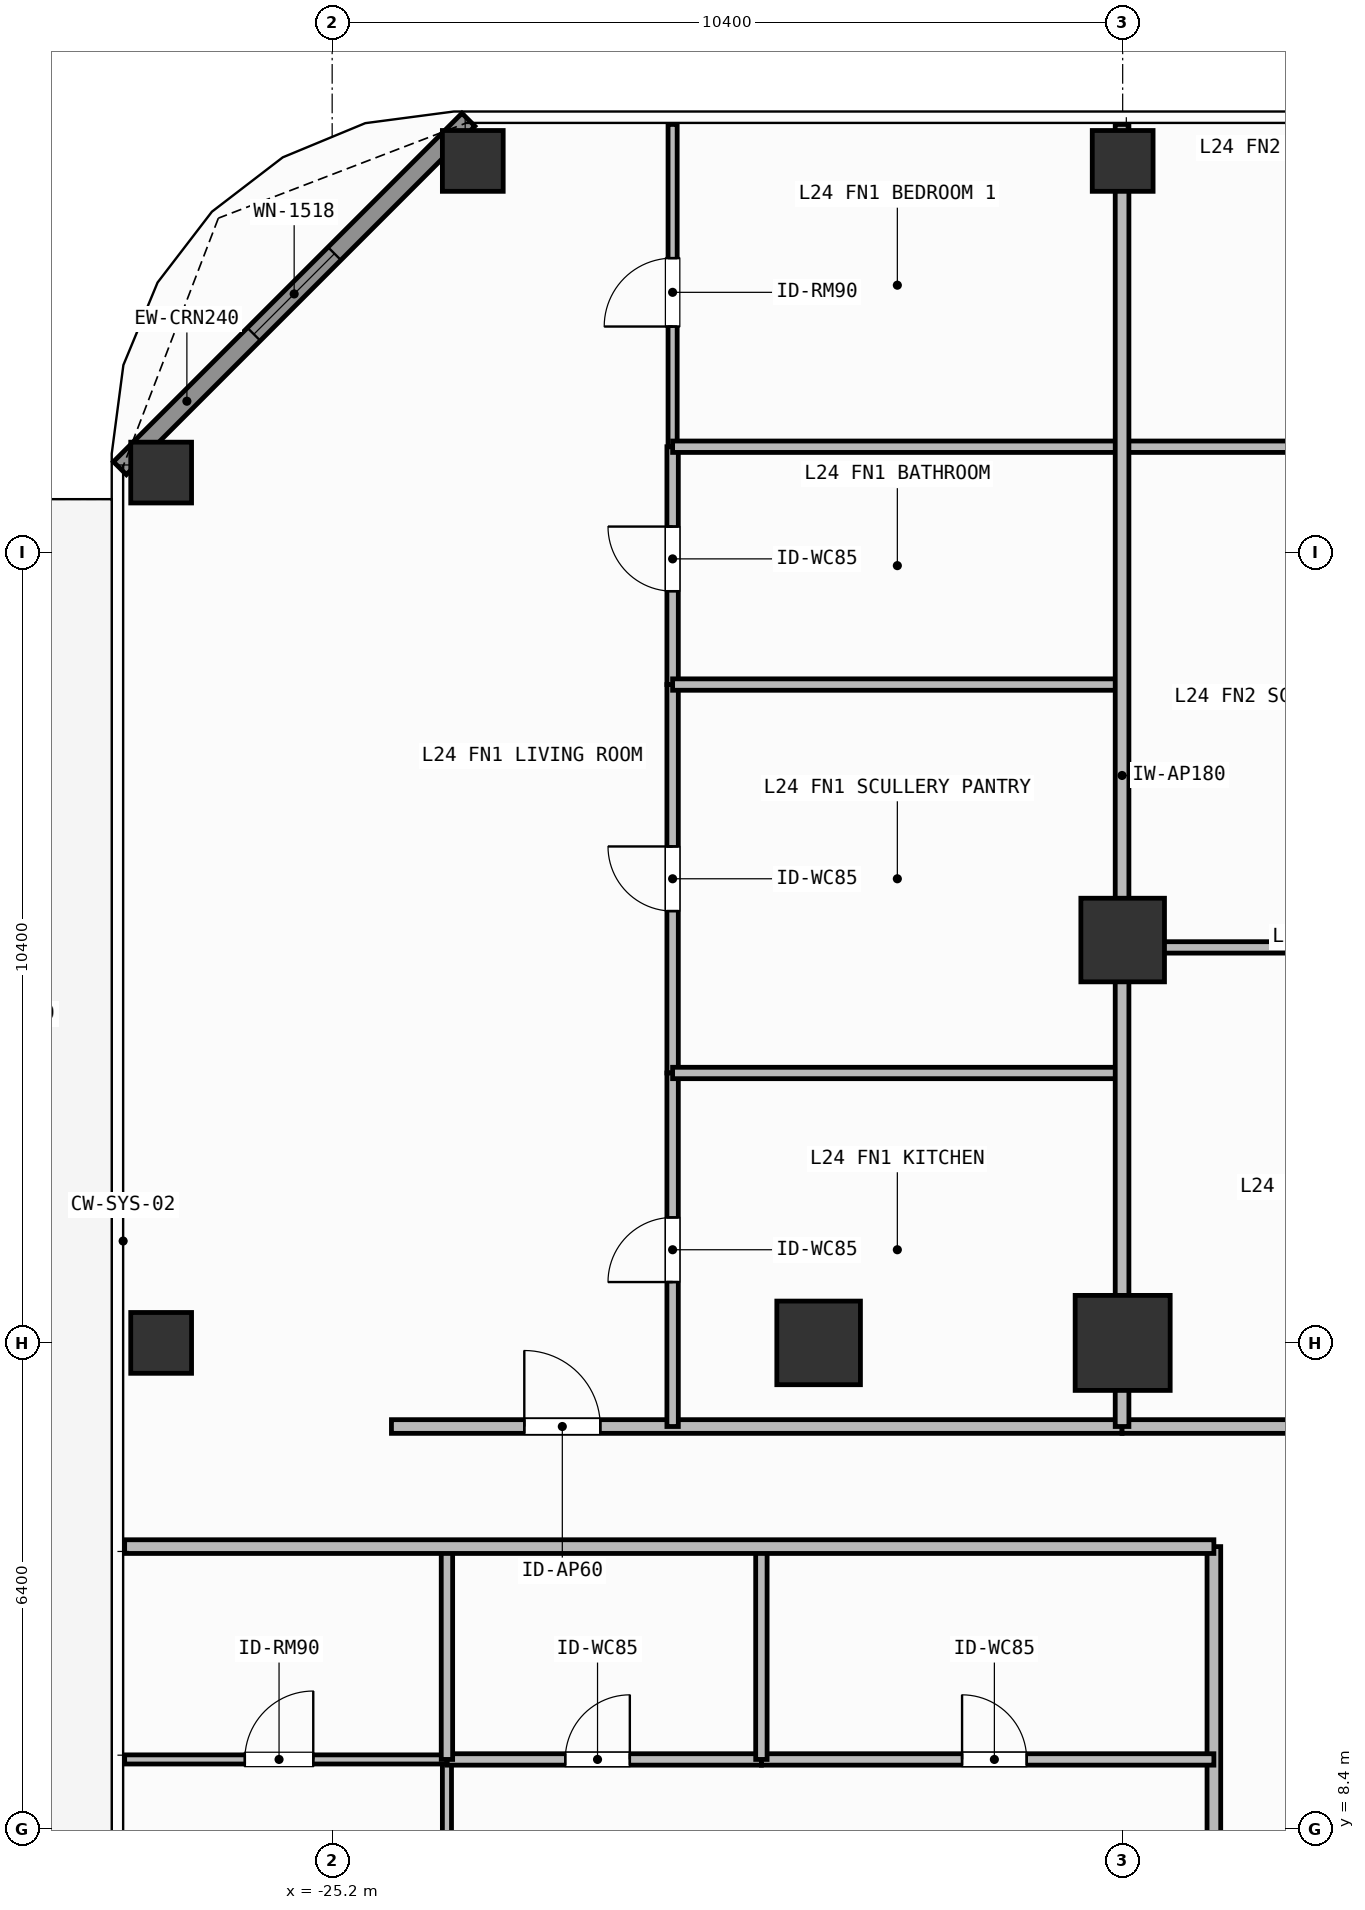
"""IFC4 building model, lengths in metres.
Left out: names, types, materials, properties, quantities, classifications, styles, units other than length and angle.
Written with IfcOpenShell. Run it as: python <this file> out.ifc"""

import sys

from ifc_helpers import new_model, si_unit, direction, frame, frame_2d, origin, origin_2d, place, context, subcontext, project, spatial, rectangle, hollow_rectangle, extrude, element, fill, save


model = new_model("IFC4")
c1 = context("Model", 3, precision=1e-05, world=origin(), true_north=direction((0.0, 1.0)))
c2 = subcontext(c1, "Body", "Model", "MODEL_VIEW")
j1 = project(units=[si_unit("LENGTHUNIT", "METRE"), si_unit("PLANEANGLEUNIT", "RADIAN")], contexts=[c1])
p1 = place(None, origin())
s1 = spatial("IfcSite", under=j1, at=p1, CompositionType="ELEMENT")
p2 = place(p1, origin())
s2 = spatial("IfcBuilding", under=s1, at=p2, CompositionType="ELEMENT")
p3 = place(p2, frame((0.0, 0.0, 96.9)))
s3 = spatial("IfcBuildingStorey", under=s2, at=p3, CompositionType="ELEMENT", Elevation=96.9)
p4 = place(p3, frame((-14.8, 14.8, 0.0), z_axis=(0.0, 0.0, 1.0), x_axis=(1.0, 0.0, 0.0)))
e1 = element("IfcColumn", 1, at=p4, inside=s3, PredefinedType="COLUMN", context=c2, shape_type="SweptSolid", body=[
    extrude(rectangle(XDim=1.25, YDim=1.25, at=origin_2d()), origin(), (0.0, 0.0, 1.0), 3.9),
])
for number, where, z_axis, x_axis in (
    (2, (-18.8, 14.8, 0.0), (0.0, 0.0, 1.0), (1.0, 0.0, 0.0)),
    (3, (-14.8, 20.1, 0.0), (0.0, 0.0, 1.0), (1.0, 0.0, 0.0)),
):
    element("IfcColumn", number, at=place(p3, frame(where, z_axis=z_axis, x_axis=x_axis)), inside=s3, PredefinedType="COLUMN", context=c2, shape_type="SweptSolid", body=[
        extrude(rectangle(XDim=1.1, YDim=1.1, at=origin_2d()), origin(), (0.0, 0.0, 1.0), 3.9),
    ])
for number, where, z_axis, x_axis in (
    (4, (-23.35, 30.35, 0.0), (0.0, 0.0, 1.0), (1.0, 0.0, 0.0)),
    (5, (-27.45, 26.25, 0.0), (0.0, 0.0, 1.0), (1.0, 0.0, 0.0)),
    (6, (-14.8, 30.35, 0.0), (0.0, 0.0, 1.0), (1.0, 0.0, 0.0)),
    (7, (-27.45, 14.8, 0.0), (0.0, 0.0, 1.0), (1.0, 0.0, 0.0)),
):
    element("IfcColumn", number, at=place(p3, frame(where, z_axis=z_axis, x_axis=x_axis)), inside=s3, PredefinedType="COLUMN", context=c2, shape_type="SweptSolid", body=[
        extrude(hollow_rectangle(XDim=0.8, YDim=0.8, WallThickness=0.036, at=origin_2d()), origin(), (0.0, 0.0, 1.0), 3.9),
    ])
p5 = place(p3, frame((-27.992, 26.308, 0.0), z_axis=(0.0, 0.0, 1.0), x_axis=(0.707106781187, 0.707106781187, 0.0)))
e8 = element("IfcWall", 8, at=p5, inside=s3, PredefinedType="SOLIDWALL", context=c2, shape_type="SweptSolid", body=[
    extrude(rectangle(XDim=6.484, YDim=0.24, at=frame_2d((3.242, 0.0))), origin(), (0.0, 0.0, 1.0), 3.68),
])
p6 = place(p5, frame((2.492, 0.0, 0.8)))
e9 = element("IfcOpeningElement", 9, at=p6, cuts=e8, PredefinedType="OPENING", context=c2, shape_type="SweptSolid", body=[
    extrude(rectangle(XDim=1.5, YDim=1.85, at=frame_2d((0.75, 0.925))), frame((0.0, 0.13, 0.0), z_axis=(0.0, -1.0, 0.0), x_axis=(1.0, 0.0, 0.0)), (0.0, 0.0, 1.0), 0.26),
])
p7 = place(p3, frame((-24.42, 13.7, 0.0), z_axis=(0.0, 0.0, 1.0), x_axis=(1.0, 0.0, 0.0)))
e10 = element("IfcWall", 10, at=p7, inside=s3, PredefinedType="PARTITIONING", context=c2, shape_type="SweptSolid", body=[
    extrude(rectangle(XDim=9.612, YDim=0.18, at=frame_2d((4.806, 0.0))), origin(), (0.0, 0.0, 1.0), 3.68),
])
p8 = place(p7, frame((1.748, 0.0, 0.0)))
e11 = element("IfcOpeningElement", 11, at=p8, cuts=e10, PredefinedType="OPENING", context=c2, shape_type="SweptSolid", body=[
    extrude(rectangle(XDim=1.0, YDim=2.2, at=frame_2d((0.5, 1.1))), frame((0.0, 0.1, 0.0), z_axis=(0.0, -1.0, 0.0), x_axis=(1.0, 0.0, 0.0)), (0.0, 0.0, 1.0), 0.2),
])
p9 = place(p3, frame((-20.721, 18.351, 0.0), z_axis=(0.0, 0.0, 1.0), x_axis=(0.0, 1.0, 0.0)))
e12 = element("IfcWall", 12, at=p9, inside=s3, PredefinedType="PARTITIONING", context=c2, shape_type="SweptSolid", body=[
    extrude(rectangle(XDim=5.11, YDim=0.15, at=frame_2d((2.555, 0.0))), origin(), (0.0, 0.0, 1.0), 3.68),
])
p10 = place(p9, frame((2.13, 0.0, 0.0)))
e13 = element("IfcOpeningElement", 13, at=p10, cuts=e12, PredefinedType="OPENING", context=c2, shape_type="SweptSolid", body=[
    extrude(rectangle(XDim=0.85, YDim=2.1, at=frame_2d((0.425, 1.05))), frame((0.0, 0.085, 0.0), z_axis=(0.0, -1.0, 0.0), x_axis=(1.0, 0.0, 0.0)), (0.0, 0.0, 1.0), 0.17),
])
p11 = place(p3, frame((-20.721, 13.7, 0.0), z_axis=(0.0, 0.0, 1.0), x_axis=(0.0, 1.0, 0.0)))
e14 = element("IfcWall", 14, at=p11, inside=s3, PredefinedType="PARTITIONING", context=c2, shape_type="SweptSolid", body=[
    extrude(rectangle(XDim=4.651, YDim=0.15, at=frame_2d((2.326, 0.0))), origin(), (0.0, 0.0, 1.0), 3.68),
])
p12 = place(p11, frame((1.9, 0.0, 0.0)))
e15 = element("IfcOpeningElement", 15, at=p12, cuts=e14, PredefinedType="OPENING", context=c2, shape_type="SweptSolid", body=[
    extrude(rectangle(XDim=0.85, YDim=2.1, at=frame_2d((0.425, 1.05))), frame((0.0, 0.085, 0.0), z_axis=(0.0, -1.0, 0.0), x_axis=(1.0, 0.0, 0.0)), (0.0, 0.0, 1.0), 0.17),
])
p13 = place(p3, frame((-20.721, 23.461, 0.0), z_axis=(0.0, 0.0, 1.0), x_axis=(0.0, 1.0, 0.0)))
e16 = element("IfcWall", 16, at=p13, inside=s3, PredefinedType="PARTITIONING", context=c2, shape_type="SweptSolid", body=[
    extrude(rectangle(XDim=3.129, YDim=0.15, at=frame_2d((1.564, 0.0))), origin(), (0.0, 0.0, 1.0), 3.68),
])
p14 = place(p13, frame((1.229, 0.0, 0.0)))
e17 = element("IfcOpeningElement", 17, at=p14, cuts=e16, PredefinedType="OPENING", context=c2, shape_type="SweptSolid", body=[
    extrude(rectangle(XDim=0.85, YDim=2.1, at=frame_2d((0.425, 1.05))), frame((0.0, 0.085, 0.0), z_axis=(0.0, -1.0, 0.0), x_axis=(1.0, 0.0, 0.0)), (0.0, 0.0, 1.0), 0.17),
])
p15 = place(p3, frame((-20.721, 26.59, 0.0), z_axis=(0.0, 0.0, 1.0), x_axis=(0.0, 1.0, 0.0)))
e18 = element("IfcWall", 18, at=p15, inside=s3, PredefinedType="PARTITIONING", context=c2, shape_type="SweptSolid", body=[
    extrude(rectangle(XDim=4.24, YDim=0.12, at=frame_2d((2.12, 0.0))), origin(), (0.0, 0.0, 1.0), 3.68),
])
p16 = place(p15, frame((1.581, 0.0, 0.0)))
e19 = element("IfcOpeningElement", 19, at=p16, cuts=e18, PredefinedType="OPENING", context=c2, shape_type="SweptSolid", body=[
    extrude(rectangle(XDim=0.9, YDim=2.1, at=frame_2d((0.45, 1.05))), frame((0.0, 0.07, 0.0), z_axis=(0.0, -1.0, 0.0), x_axis=(1.0, 0.0, 0.0)), (0.0, 0.0, 1.0), 0.14),
])
p17 = place(p3, frame((-14.808, 13.7, 0.0), z_axis=(0.0, 0.0, 1.0), x_axis=(1.0, 0.0, 0.0)))
e20 = element("IfcWall", 20, at=p17, inside=s3, PredefinedType="PARTITIONING", context=c2, shape_type="SweptSolid", body=[
    extrude(rectangle(XDim=21.212, YDim=0.18, at=frame_2d((10.606, 0.0))), origin(), (0.0, 0.0, 1.0), 3.68),
])
p18 = place(p17, frame((11.271, 0.0, 0.0)))
e21 = element("IfcOpeningElement", 21, at=p18, cuts=e20, PredefinedType="OPENING", context=c2, shape_type="SweptSolid", body=[
    extrude(rectangle(XDim=1.0, YDim=2.2, at=frame_2d((0.5, 1.1))), frame((0.0, 0.1, 0.0), z_axis=(0.0, -1.0, 0.0), x_axis=(1.0, 0.0, 0.0)), (0.0, 0.0, 1.0), 0.2),
])
p19 = place(p3, frame((-13.6, -1.6, 0.0), z_axis=(0.0, 0.0, 1.0), x_axis=(0.0, 1.0, 0.0)))
e22 = element("IfcWall", 22, at=p19, inside=s3, PredefinedType="PARTITIONING", context=c2, shape_type="SweptSolid", body=[
    extrude(rectangle(XDim=13.72, YDim=0.18, at=frame_2d((6.86, 0.0))), origin(), (0.0, 0.0, 1.0), 3.68),
])
p20 = place(p19, frame((6.989, 0.0, 0.0)))
e23 = element("IfcOpeningElement", 23, at=p20, cuts=e22, PredefinedType="OPENING", context=c2, shape_type="SweptSolid", body=[
    extrude(rectangle(XDim=1.0, YDim=2.2, at=frame_2d((0.5, 1.1))), frame((0.0, 0.1, 0.0), z_axis=(0.0, -1.0, 0.0), x_axis=(1.0, 0.0, 0.0)), (0.0, 0.0, 1.0), 0.2),
])
p21 = place(p3, frame((-23.69, 2.591, 0.0), z_axis=(0.0, 0.0, 1.0), x_axis=(0.0, 1.0, 0.0)))
e24 = element("IfcWall", 24, at=p21, inside=s3, PredefinedType="PARTITIONING", context=c2, shape_type="SweptSolid", body=[
    extrude(rectangle(XDim=6.729, YDim=0.12, at=frame_2d((3.365, 0.0))), origin(), (0.0, 0.0, 1.0), 3.68),
])
p22 = place(p21, frame((2.826, 0.0, 0.0)))
e25 = element("IfcOpeningElement", 25, at=p22, cuts=e24, PredefinedType="OPENING", context=c2, shape_type="SweptSolid", body=[
    extrude(rectangle(XDim=0.9, YDim=2.1, at=frame_2d((0.45, 1.05))), frame((0.0, 0.07, 0.0), z_axis=(0.0, -1.0, 0.0), x_axis=(1.0, 0.0, 0.0)), (0.0, 0.0, 1.0), 0.14),
])
p23 = place(p3, frame((-23.69, 9.32, 0.0), z_axis=(0.0, 0.0, 1.0), x_axis=(1.0, 0.0, 0.0)))
e26 = element("IfcWall", 26, at=p23, inside=s3, PredefinedType="PARTITIONING", context=c2, shape_type="SweptSolid", body=[
    extrude(rectangle(XDim=4.137, YDim=0.15, at=frame_2d((2.068, 0.0))), origin(), (0.0, 0.0, 1.0), 3.68),
])
p24 = place(p23, frame((1.556, 0.0, 0.0)))
e27 = element("IfcOpeningElement", 27, at=p24, cuts=e26, PredefinedType="OPENING", context=c2, shape_type="SweptSolid", body=[
    extrude(rectangle(XDim=0.85, YDim=2.1, at=frame_2d((0.425, 1.05))), frame((0.0, 0.085, 0.0), z_axis=(0.0, -1.0, 0.0), x_axis=(1.0, 0.0, 0.0)), (0.0, 0.0, 1.0), 0.17),
])
p25 = place(p3, frame((-19.553, 9.32, 0.0), z_axis=(0.0, 0.0, 1.0), x_axis=(1.0, 0.0, 0.0)))
e28 = element("IfcWall", 28, at=p25, inside=s3, PredefinedType="PARTITIONING", context=c2, shape_type="SweptSolid", body=[
    extrude(rectangle(XDim=5.953, YDim=0.15, at=frame_2d((2.977, 0.0))), origin(), (0.0, 0.0, 1.0), 3.68),
])
p26 = place(p25, frame((2.64, 0.0, 0.0)))
e29 = element("IfcOpeningElement", 29, at=p26, cuts=e28, PredefinedType="OPENING", context=c2, shape_type="SweptSolid", body=[
    extrude(rectangle(XDim=0.85, YDim=2.1, at=frame_2d((0.425, 1.05))), frame((0.0, 0.085, 0.0), z_axis=(0.0, -1.0, 0.0), x_axis=(1.0, 0.0, 0.0)), (0.0, 0.0, 1.0), 0.17),
])
p27 = place(p3, frame((-27.93, 9.32, 0.0), z_axis=(0.0, 0.0, 1.0), x_axis=(1.0, 0.0, 0.0)))
e30 = element("IfcWall", 30, at=p27, inside=s3, PredefinedType="PARTITIONING", context=c2, shape_type="SweptSolid", body=[
    extrude(rectangle(XDim=4.24, YDim=0.12, at=frame_2d((2.12, 0.0))), origin(), (0.0, 0.0, 1.0), 3.68),
])
p28 = place(p27, frame((1.581, 0.0, 0.0)))
e31 = element("IfcOpeningElement", 31, at=p28, cuts=e30, PredefinedType="OPENING", context=c2, shape_type="SweptSolid", body=[
    extrude(rectangle(XDim=0.9, YDim=2.1, at=frame_2d((0.45, 1.05))), frame((0.0, 0.07, 0.0), z_axis=(0.0, -1.0, 0.0), x_axis=(1.0, 0.0, 0.0)), (0.0, 0.0, 1.0), 0.14),
])
for number, where, z_axis, x_axis in (
    (32, (-20.721, 18.351, 0.0), (0.0, 0.0, 1.0), (1.0, 0.0, 0.0)),
    (33, (-20.721, 23.461, 0.0), (0.0, 0.0, 1.0), (1.0, 0.0, 0.0)),
    (34, (-20.721, 26.59, 0.0), (0.0, 0.0, 1.0), (1.0, 0.0, 0.0)),
):
    element("IfcWall", number, at=place(p3, frame(where, z_axis=z_axis, x_axis=x_axis)), inside=s3, PredefinedType="PARTITIONING", context=c2, shape_type="SweptSolid", body=[
        extrude(rectangle(XDim=5.913, YDim=0.15, at=frame_2d((2.957, 0.0))), origin(), (0.0, 0.0, 1.0), 3.68),
    ])
p29 = place(p3, frame((-14.808, 20.003, 0.0), z_axis=(0.0, 0.0, 1.0), x_axis=(1.0, 0.0, 0.0)))
e35 = element("IfcWall", 35, at=p29, inside=s3, PredefinedType="PARTITIONING", context=c2, shape_type="SweptSolid", body=[
    extrude(rectangle(XDim=5.394, YDim=0.15, at=frame_2d((2.697, 0.0))), origin(), (0.0, 0.0, 1.0), 3.082),
])
p30 = place(p3, frame((-14.808, 26.59, 0.0), z_axis=(0.0, 0.0, 1.0), x_axis=(1.0, 0.0, 0.0)))
e36 = element("IfcWall", 36, at=p30, inside=s3, PredefinedType="PARTITIONING", context=c2, shape_type="SweptSolid", body=[
    extrude(rectangle(XDim=5.394, YDim=0.15, at=frame_2d((2.697, 0.0))), origin(), (0.0, 0.0, 1.0), 3.68),
])
p31 = place(p3, frame((-14.808, 13.7, 0.0), z_axis=(0.0, 0.0, 1.0), x_axis=(0.0, 1.0, 0.0)))
e37 = element("IfcWall", 37, at=p31, inside=s3, PredefinedType="PARTITIONING", context=c2, shape_type="SweptSolid", body=[
    extrude(rectangle(XDim=17.13, YDim=0.18, at=frame_2d((8.565, 0.0))), origin(), (0.0, 0.0, 1.0), 3.082),
])
for number, where, z_axis, x_axis in (
    (38, (-19.553, 9.32, 0.0), (0.0, 0.0, 1.0), (0.0, 1.0, 0.0)),
    (39, (-23.69, 9.32, 0.0), (0.0, 0.0, 1.0), (0.0, 1.0, 0.0)),
):
    element("IfcWall", number, at=place(p3, frame(where, z_axis=z_axis, x_axis=x_axis)), inside=s3, PredefinedType="PARTITIONING", context=c2, shape_type="SweptSolid", body=[
        extrude(rectangle(XDim=2.8, YDim=0.15, at=frame_2d((1.4, 0.0))), origin(), (0.0, 0.0, 1.0), 3.68),
    ])
p32 = place(p3, frame((-27.93, 12.12, 0.0), z_axis=(0.0, 0.0, 1.0), x_axis=(1.0, 0.0, 0.0)))
e40 = element("IfcWall", 40, at=p32, inside=s3, PredefinedType="PARTITIONING", context=c2, shape_type="SweptSolid", body=[
    extrude(rectangle(XDim=14.33, YDim=0.18, at=frame_2d((7.165, 0.0))), origin(), (0.0, 0.0, 1.0), 3.68),
])
p33 = place(p6, origin())
e41 = element("IfcWindow", 41, at=p33, inside=s3, PartitioningType="SINGLE_PANEL", PredefinedType="WINDOW", context=c2, shape_type="SweptSolid", body=[
    extrude(rectangle(XDim=1.5, YDim=1.85, at=frame_2d((0.75, 0.925))), frame((0.0, 0.03, 0.0), z_axis=(0.0, -1.0, 0.0), x_axis=(1.0, 0.0, 0.0)), (0.0, 0.0, 1.0), 0.06),
])
fill(e9, e41)
p34 = place(p8, origin())
e42 = element("IfcDoor", 42, at=p34, inside=s3, OperationType="SINGLE_SWING_LEFT", PredefinedType="DOOR", context=c2, shape_type="SweptSolid", body=[
    extrude(rectangle(XDim=1.0, YDim=2.2, at=frame_2d((0.5, 1.1))), frame((0.0, 0.025, 0.0), z_axis=(0.0, -1.0, 0.0), x_axis=(1.0, 0.0, 0.0)), (0.0, 0.0, 1.0), 0.05),
])
fill(e11, e42)
p35 = place(p10, origin())
e43 = element("IfcDoor", 43, at=p35, inside=s3, OperationType="SINGLE_SWING_RIGHT", PredefinedType="DOOR", context=c2, shape_type="SweptSolid", body=[
    extrude(rectangle(XDim=0.85, YDim=2.1, at=frame_2d((0.425, 1.05))), frame((0.0, 0.025, 0.0), z_axis=(0.0, -1.0, 0.0), x_axis=(1.0, 0.0, 0.0)), (0.0, 0.0, 1.0), 0.05),
])
fill(e13, e43)
p36 = place(p12, origin())
e44 = element("IfcDoor", 44, at=p36, inside=s3, OperationType="SINGLE_SWING_LEFT", PredefinedType="DOOR", context=c2, shape_type="SweptSolid", body=[
    extrude(rectangle(XDim=0.85, YDim=2.1, at=frame_2d((0.425, 1.05))), frame((0.0, 0.025, 0.0), z_axis=(0.0, -1.0, 0.0), x_axis=(1.0, 0.0, 0.0)), (0.0, 0.0, 1.0), 0.05),
])
fill(e15, e44)
p37 = place(p14, origin())
e45 = element("IfcDoor", 45, at=p37, inside=s3, OperationType="SINGLE_SWING_RIGHT", PredefinedType="DOOR", context=c2, shape_type="SweptSolid", body=[
    extrude(rectangle(XDim=0.85, YDim=2.1, at=frame_2d((0.425, 1.05))), frame((0.0, 0.025, 0.0), z_axis=(0.0, -1.0, 0.0), x_axis=(1.0, 0.0, 0.0)), (0.0, 0.0, 1.0), 0.05),
])
fill(e17, e45)
p38 = place(p16, origin())
e46 = element("IfcDoor", 46, at=p38, inside=s3, OperationType="SINGLE_SWING_LEFT", PredefinedType="DOOR", context=c2, shape_type="SweptSolid", body=[
    extrude(rectangle(XDim=0.9, YDim=2.1, at=frame_2d((0.45, 1.05))), frame((0.0, 0.025, 0.0), z_axis=(0.0, -1.0, 0.0), x_axis=(1.0, 0.0, 0.0)), (0.0, 0.0, 1.0), 0.05),
])
fill(e19, e46)
p39 = place(p24, origin())
e47 = element("IfcDoor", 47, at=p39, inside=s3, OperationType="SINGLE_SWING_RIGHT", PredefinedType="DOOR", context=c2, shape_type="SweptSolid", body=[
    extrude(rectangle(XDim=0.85, YDim=2.1, at=frame_2d((0.425, 1.05))), frame((0.0, 0.025, 0.0), z_axis=(0.0, -1.0, 0.0), x_axis=(1.0, 0.0, 0.0)), (0.0, 0.0, 1.0), 0.05),
])
fill(e27, e47)
p40 = place(p26, origin())
e48 = element("IfcDoor", 48, at=p40, inside=s3, OperationType="SINGLE_SWING_LEFT", PredefinedType="DOOR", context=c2, shape_type="SweptSolid", body=[
    extrude(rectangle(XDim=0.85, YDim=2.1, at=frame_2d((0.425, 1.05))), frame((0.0, 0.025, 0.0), z_axis=(0.0, -1.0, 0.0), x_axis=(1.0, 0.0, 0.0)), (0.0, 0.0, 1.0), 0.05),
])
fill(e29, e48)
p41 = place(p28, origin())
e49 = element("IfcDoor", 49, at=p41, inside=s3, OperationType="SINGLE_SWING_RIGHT", PredefinedType="DOOR", context=c2, shape_type="SweptSolid", body=[
    extrude(rectangle(XDim=0.9, YDim=2.1, at=frame_2d((0.45, 1.05))), frame((0.0, 0.025, 0.0), z_axis=(0.0, -1.0, 0.0), x_axis=(1.0, 0.0, 0.0)), (0.0, 0.0, 1.0), 0.05),
])
fill(e31, e49)
save(model, sys.argv[1])
